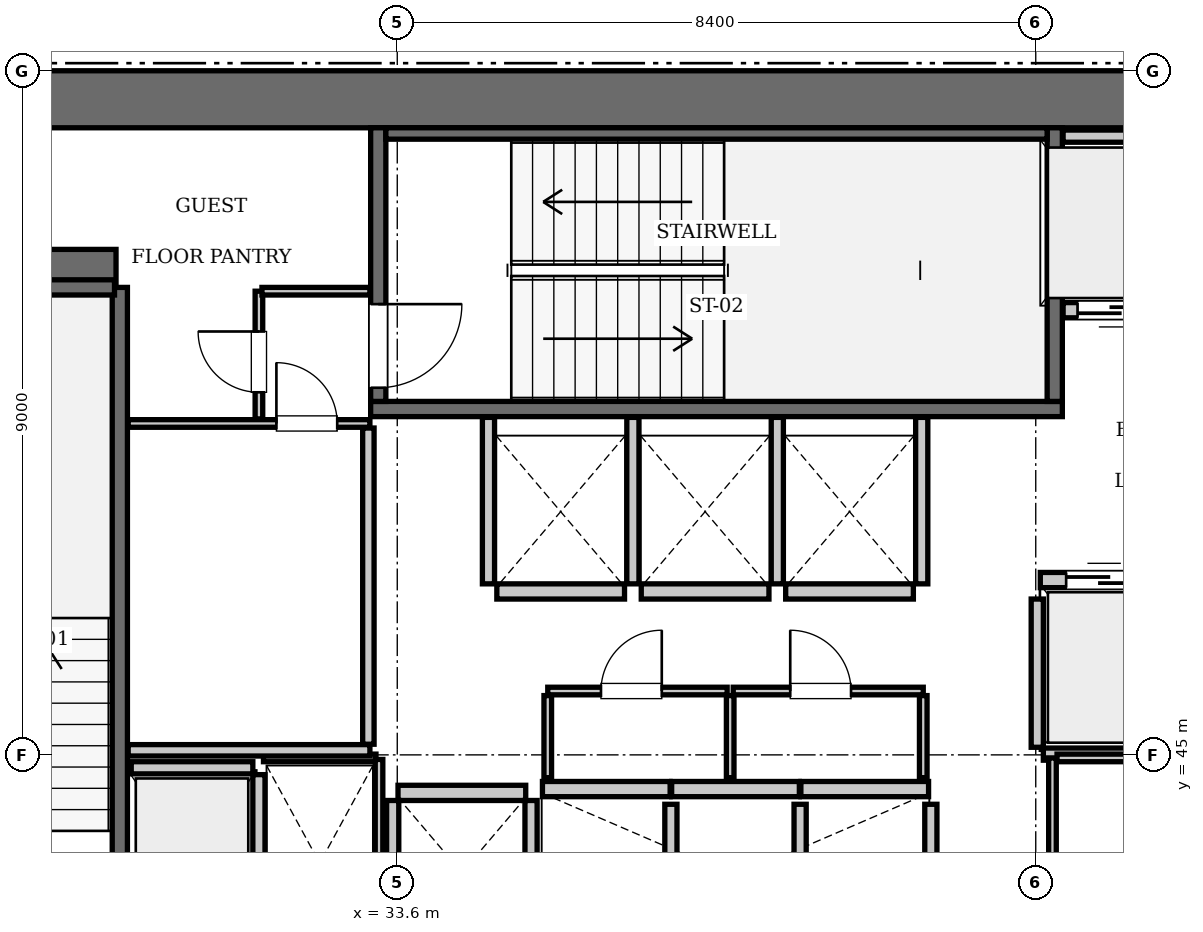
"""IFC4 building model, lengths in metres.
Left out: names, types, materials, properties, quantities, classifications, styles, units other than length and angle.
Written with IfcOpenShell. Run it as: python <this file> out.ifc"""

import sys

from ifc_helpers import new_model, si_unit, direction, frame, frame_2d, origin, place, context, subcontext, project, spatial, rectangle, extrude, element, fill, save


model = new_model("IFC4")
c1 = context("Model", 3, precision=1e-05, world=origin(), true_north=direction((0.0, 1.0)))
c2 = subcontext(c1, "Body", "Model", "MODEL_VIEW")
j1 = project(units=[si_unit("LENGTHUNIT", "METRE"), si_unit("PLANEANGLEUNIT", "RADIAN")], contexts=[c1])
p1 = place(None, origin())
s1 = spatial("IfcSite", under=j1, at=p1, CompositionType="ELEMENT")
p2 = place(p1, origin())
s2 = spatial("IfcBuilding", under=s1, at=p2, CompositionType="ELEMENT")
p3 = place(p2, frame((0.0, 0.0, 158.2)))
s3 = spatial("IfcBuildingStorey", under=s2, at=p3, CompositionType="ELEMENT", Elevation=158.2)
p4 = place(p3, frame((25.2, 53.625, 0.0), z_axis=(0.0, 0.0, 1.0), x_axis=(1.0, 0.0, 0.0)))
e1 = element("IfcWall", 1, at=p4, inside=s3, PredefinedType="SHEAR", context=c2, shape_type="SweptSolid", body=[
    extrude(rectangle(XDim=25.2, YDim=0.75, at=frame_2d((12.6, 0.0))), origin(), (0.0, 0.0, 1.0), 3.85),
])
p5 = place(p3, frame((25.95, 51.4, 0.0), z_axis=(0.0, 0.0, 1.0), x_axis=(1.0, 0.0, 0.0)))
e2 = element("IfcWall", 2, at=p5, inside=s3, PredefinedType="SHEAR", context=c2, shape_type="SweptSolid", body=[
    extrude(rectangle(XDim=3.95, YDim=0.5, at=frame_2d((1.975, 0.0))), origin(), (0.0, 0.0, 1.0), 3.85),
])
p6 = place(p3, frame((29.95, 42.15, 0.0), z_axis=(0.0, 0.0, 1.0), x_axis=(0.0, 1.0, 0.0)))
e3 = element("IfcWall", 3, at=p6, inside=s3, PredefinedType="SOLIDWALL", context=c2, shape_type="SweptSolid", body=[
    extrude(rectangle(XDim=9.0, YDim=0.2, at=frame_2d((4.5, 0.0))), origin(), (0.0, 0.0, 1.0), 3.61),
])
p7 = place(p3, frame((26.38, 51.15, 0.0), z_axis=(0.0, 0.0, 1.0), x_axis=(1.0, 0.0, 0.0)))
e4 = element("IfcWall", 4, at=p7, inside=s3, PredefinedType="SOLIDWALL", context=c2, shape_type="SweptSolid", body=[
    extrude(rectangle(XDim=3.5, YDim=0.2, at=frame_2d((1.75, 0.0))), origin(), (0.0, 0.0, 1.0), 3.61),
])
p8 = place(p3, frame((33.25, 49.55, 0.0), z_axis=(0.0, 0.0, 1.0), x_axis=(1.0, 0.0, 0.0)))
e5 = element("IfcWall", 5, at=p8, inside=s3, PredefinedType="SOLIDWALL", context=c2, shape_type="SweptSolid", body=[
    extrude(rectangle(XDim=9.1, YDim=0.2, at=frame_2d((4.55, 0.0))), origin(), (0.0, 0.0, 1.0), 3.61),
])
p9 = place(p3, frame((42.25, 49.65, 0.0), z_axis=(0.0, 0.0, 1.0), x_axis=(0.0, 1.0, 0.0)))
e6 = element("IfcWall", 6, at=p9, inside=s3, PredefinedType="SOLIDWALL", context=c2, shape_type="SweptSolid", body=[
    extrude(rectangle(XDim=3.6, YDim=0.2, at=frame_2d((1.8, 0.0))), origin(), (0.0, 0.0, 1.0), 3.61),
])
p10 = place(p3, frame((33.35, 49.65, 0.0), z_axis=(0.0, 0.0, 1.0), x_axis=(0.0, 1.0, 0.0)))
e7 = element("IfcWall", 7, at=p10, inside=s3, PredefinedType="SOLIDWALL", context=c2, shape_type="SweptSolid", body=[
    extrude(rectangle(XDim=3.6, YDim=0.2, at=frame_2d((1.8, 0.0))), origin(), (0.0, 0.0, 1.0), 3.61),
])
p11 = place(p10, frame((0.18, 0.0, 0.0)))
e8 = element("IfcOpeningElement", 8, at=p11, cuts=e7, PredefinedType="OPENING", context=c2, shape_type="SweptSolid", body=[
    extrude(rectangle(XDim=1.1, YDim=2.15, at=frame_2d((0.55, 1.075))), frame((0.0, 0.11, 0.0), z_axis=(0.0, -1.0, 0.0), x_axis=(1.0, 0.0, 0.0)), (0.0, 0.0, 1.0), 0.22),
])
p12 = place(p3, frame((33.45, 53.175, 0.0), z_axis=(0.0, 0.0, 1.0), x_axis=(1.0, 0.0, 0.0)))
e9 = element("IfcWall", 9, at=p12, inside=s3, PredefinedType="SOLIDWALL", context=c2, shape_type="SweptSolid", body=[
    extrude(rectangle(XDim=8.7, YDim=0.15, at=frame_2d((4.35, 0.0))), origin(), (0.0, 0.0, 1.0), 3.61),
])
p13 = place(p3, frame((42.06, 47.3, 0.0), z_axis=(0.0, 0.0, 1.0), x_axis=(1.0, 0.0, 0.0)))
e10 = element("IfcWall", 10, at=p13, inside=s3, PredefinedType="SOLIDWALL", context=c2, shape_type="SweptSolid", body=[
    extrude(rectangle(XDim=1.68, YDim=0.2, at=frame_2d((0.84, 0.0))), origin(), (0.0, 0.0, 1.0), 3.61),
])
p14 = place(p13, frame((0.34, 0.0, 0.0)))
e11 = element("IfcOpeningElement", 11, at=p14, cuts=e10, PredefinedType="OPENING", context=c2, shape_type="SweptSolid", body=[
    extrude(rectangle(XDim=1.0, YDim=2.15, at=frame_2d((0.5, 1.075))), frame((0.0, 0.11, 0.0), z_axis=(0.0, -1.0, 0.0), x_axis=(1.0, 0.0, 0.0)), (0.0, 0.0, 1.0), 0.22),
])
p15 = place(p3, frame((42.36, 50.85, 0.0), z_axis=(0.0, 0.0, 1.0), x_axis=(1.0, 0.0, 0.0)))
e12 = element("IfcWall", 12, at=p15, inside=s3, PredefinedType="SOLIDWALL", context=c2, shape_type="SweptSolid", body=[
    extrude(rectangle(XDim=1.38, YDim=0.2, at=frame_2d((0.69, 0.0))), origin(), (0.0, 0.0, 1.0), 3.61),
])
p16 = place(p15, frame((0.19, 0.0, 0.0)))
e13 = element("IfcOpeningElement", 13, at=p16, cuts=e12, PredefinedType="OPENING", context=c2, shape_type="SweptSolid", body=[
    extrude(rectangle(XDim=1.0, YDim=2.15, at=frame_2d((0.5, 1.075))), frame((0.0, 0.11, 0.0), z_axis=(0.0, -1.0, 0.0), x_axis=(1.0, 0.0, 0.0)), (0.0, 0.0, 1.0), 0.22),
])
for number, where, z_axis, x_axis in (
    (14, (35.51, 44.55, 0.0), (0.0, 0.0, 1.0), (1.0, 0.0, 0.0)),
    (15, (37.21, 44.55, 0.0), (0.0, 0.0, 1.0), (1.0, 0.0, 0.0)),
):
    element("IfcWall", number, at=place(p3, frame(where, z_axis=z_axis, x_axis=x_axis)), inside=s3, PredefinedType="SOLIDWALL", context=c2, shape_type="SweptSolid", body=[
        extrude(rectangle(XDim=1.68, YDim=0.2, at=frame_2d((0.84, 0.0))), origin(), (0.0, 0.0, 1.0), 3.61),
    ])
for number, where, z_axis, x_axis in (
    (16, (38.91, 44.55, 0.0), (0.0, 0.0, 1.0), (1.0, 0.0, 0.0)),
    (17, (34.91, 47.15, 0.0), (0.0, 0.0, 1.0), (1.0, 0.0, 0.0)),
):
    element("IfcWall", number, at=place(p3, frame(where, z_axis=z_axis, x_axis=x_axis)), inside=s3, PredefinedType="SOLIDWALL", context=c2, shape_type="SweptSolid", body=[
        extrude(rectangle(XDim=1.68, YDim=0.2, at=frame_2d((0.84, 0.0))), origin(), (0.0, 0.0, 1.0), 3.61),
    ])
for number, where, z_axis, x_axis in (
    (18, (36.81, 47.15, 0.0), (0.0, 0.0, 1.0), (1.0, 0.0, 0.0)),
    (19, (38.71, 47.15, 0.0), (0.0, 0.0, 1.0), (1.0, 0.0, 0.0)),
    (20, (33.61, 44.5, 0.0), (0.0, 0.0, 1.0), (1.0, 0.0, 0.0)),
):
    element("IfcWall", number, at=place(p3, frame(where, z_axis=z_axis, x_axis=x_axis)), inside=s3, PredefinedType="SOLIDWALL", context=c2, shape_type="SweptSolid", body=[
        extrude(rectangle(XDim=1.68, YDim=0.2, at=frame_2d((0.84, 0.0))), origin(), (0.0, 0.0, 1.0), 3.61),
    ])
p17 = place(p3, frame((30.1, 44.83, 0.0), z_axis=(0.0, 0.0, 1.0), x_axis=(1.0, 0.0, 0.0)))
e21 = element("IfcWall", 21, at=p17, inside=s3, PredefinedType="SOLIDWALL", context=c2, shape_type="SweptSolid", body=[
    extrude(rectangle(XDim=1.6, YDim=0.16, at=frame_2d((0.8, 0.0))), origin(), (0.0, 0.0, 1.0), 3.61),
])
p18 = place(p3, frame((31.78, 42.15, 0.0), z_axis=(0.0, 0.0, 1.0), x_axis=(0.0, 1.0, 0.0)))
e22 = element("IfcWall", 22, at=p18, inside=s3, PredefinedType="SOLIDWALL", context=c2, shape_type="SweptSolid", body=[
    extrude(rectangle(XDim=2.59, YDim=0.16, at=frame_2d((1.295, 0.0))), origin(), (0.0, 0.0, 1.0), 3.61),
])
p19 = place(p3, frame((42.02, 45.1, 0.0), z_axis=(0.0, 0.0, 1.0), x_axis=(0.0, 1.0, 0.0)))
e23 = element("IfcWall", 23, at=p19, inside=s3, PredefinedType="SOLIDWALL", context=c2, shape_type="SweptSolid", body=[
    extrude(rectangle(XDim=1.95, YDim=0.16, at=frame_2d((0.975, 0.0))), origin(), (0.0, 0.0, 1.0), 3.61),
])
p20 = place(p3, frame((42.1, 45.01, 0.0), z_axis=(0.0, 0.0, 1.0), x_axis=(1.0, 0.0, 0.0)))
e24 = element("IfcWall", 24, at=p20, inside=s3, PredefinedType="SOLIDWALL", context=c2, shape_type="SweptSolid", body=[
    extrude(rectangle(XDim=3.45, YDim=0.16, at=frame_2d((1.725, 0.0))), origin(), (0.0, 0.0, 1.0), 3.61),
])
p21 = place(p3, frame((42.36, 53.14, 0.0), z_axis=(0.0, 0.0, 1.0), x_axis=(1.0, 0.0, 0.0)))
e25 = element("IfcWall", 25, at=p21, inside=s3, PredefinedType="SOLIDWALL", context=c2, shape_type="SweptSolid", body=[
    extrude(rectangle(XDim=3.14, YDim=0.16, at=frame_2d((1.57, 0.0))), origin(), (0.0, 0.0, 1.0), 3.61),
])
for number, where, z_axis, x_axis in (
    (26, (37.2, 42.15, 0.0), (0.0, 0.0, 1.0), (0.0, 1.0, 0.0)),
    (27, (38.9, 42.15, 0.0), (0.0, 0.0, 1.0), (0.0, 1.0, 0.0)),
    (28, (40.62, 42.15, 0.0), (0.0, 0.0, 1.0), (0.0, 1.0, 0.0)),
):
    element("IfcWall", number, at=place(p3, frame(where, z_axis=z_axis, x_axis=x_axis)), inside=s3, PredefinedType="SOLIDWALL", context=c2, shape_type="SweptSolid", body=[
        extrude(rectangle(XDim=2.2, YDim=0.16, at=frame_2d((1.1, 0.0))), origin(), (0.0, 0.0, 1.0), 3.61),
    ])
for number, where, z_axis, x_axis in (
    (29, (34.8, 47.25, 0.0), (0.0, 0.0, 1.0), (0.0, 1.0, 0.0)),
    (30, (36.7, 47.25, 0.0), (0.0, 0.0, 1.0), (0.0, 1.0, 0.0)),
    (31, (38.6, 47.25, 0.0), (0.0, 0.0, 1.0), (0.0, 1.0, 0.0)),
    (32, (40.5, 47.25, 0.0), (0.0, 0.0, 1.0), (0.0, 1.0, 0.0)),
):
    element("IfcWall", number, at=place(p3, frame(where, z_axis=z_axis, x_axis=x_axis)), inside=s3, PredefinedType="SOLIDWALL", context=c2, shape_type="SweptSolid", body=[
        extrude(rectangle(XDim=2.19, YDim=0.16, at=frame_2d((1.095, 0.0))), origin(), (0.0, 0.0, 1.0), 3.61),
    ])
for number, where, z_axis, x_axis in (
    (33, (33.54, 42.15, 0.0), (0.0, 0.0, 1.0), (0.0, 1.0, 0.0)),
    (34, (35.36, 42.15, 0.0), (0.0, 0.0, 1.0), (0.0, 1.0, 0.0)),
):
    element("IfcWall", number, at=place(p3, frame(where, z_axis=z_axis, x_axis=x_axis)), inside=s3, PredefinedType="SOLIDWALL", context=c2, shape_type="SweptSolid", body=[
        extrude(rectangle(XDim=2.25, YDim=0.16, at=frame_2d((1.125, 0.0))), origin(), (0.0, 0.0, 1.0), 3.61),
    ])
p22 = place(p3, frame((31.84, 44.96, 0.0), z_axis=(0.0, 0.0, 1.0), x_axis=(1.0, 0.0, 0.0)))
e35 = element("IfcWall", 35, at=p22, inside=s3, PredefinedType="PARTITIONING", context=c2, shape_type="SweptSolid", body=[
    extrude(rectangle(XDim=1.48, YDim=0.1, at=frame_2d((0.74, 0.0))), origin(), (0.0, 0.0, 1.0), 3.61),
])
p23 = place(p3, frame((33.36, 42.21, 0.0), z_axis=(0.0, 0.0, 1.0), x_axis=(0.0, 1.0, 0.0)))
e36 = element("IfcWall", 36, at=p23, inside=s3, PredefinedType="PARTITIONING", context=c2, shape_type="SweptSolid", body=[
    extrude(rectangle(XDim=2.73, YDim=0.1, at=frame_2d((1.365, 0.0))), origin(), (0.0, 0.0, 1.0), 3.61),
])
p24 = place(p3, frame((35.58, 45.84, 0.0), z_axis=(0.0, 0.0, 1.0), x_axis=(1.0, 0.0, 0.0)))
e37 = element("IfcWall", 37, at=p24, inside=s3, PredefinedType="PARTITIONING", context=c2, shape_type="SweptSolid", body=[
    extrude(rectangle(XDim=2.36, YDim=0.1, at=frame_2d((1.18, 0.0))), origin(), (0.0, 0.0, 1.0), 3.61),
])
p25 = place(p24, frame((0.7, 0.0, 0.0)))
e38 = element("IfcOpeningElement", 38, at=p25, cuts=e37, PredefinedType="OPENING", context=c2, shape_type="SweptSolid", body=[
    extrude(rectangle(XDim=0.8, YDim=2.05, at=frame_2d((0.4, 1.025))), frame((0.0, 0.06, 0.0), z_axis=(0.0, -1.0, 0.0), x_axis=(1.0, 0.0, 0.0)), (0.0, 0.0, 1.0), 0.12),
])
p26 = place(p3, frame((38.02, 45.84, 0.0), z_axis=(0.0, 0.0, 1.0), x_axis=(1.0, 0.0, 0.0)))
e39 = element("IfcWall", 39, at=p26, inside=s3, PredefinedType="PARTITIONING", context=c2, shape_type="SweptSolid", body=[
    extrude(rectangle(XDim=2.5, YDim=0.1, at=frame_2d((1.25, 0.0))), origin(), (0.0, 0.0, 1.0), 3.61),
])
p27 = place(p26, frame((0.75, 0.0, 0.0)))
e40 = element("IfcOpeningElement", 40, at=p27, cuts=e39, PredefinedType="OPENING", context=c2, shape_type="SweptSolid", body=[
    extrude(rectangle(XDim=0.8, YDim=2.05, at=frame_2d((0.4, 1.025))), frame((0.0, 0.06, 0.0), z_axis=(0.0, -1.0, 0.0), x_axis=(1.0, 0.0, 0.0)), (0.0, 0.0, 1.0), 0.12),
])
for number, where, z_axis, x_axis in (
    (41, (35.58, 44.7, 0.0), (0.0, 0.0, 1.0), (0.0, 1.0, 0.0)),
    (42, (37.98, 44.7, 0.0), (0.0, 0.0, 1.0), (0.0, 1.0, 0.0)),
    (43, (40.52, 44.7, 0.0), (0.0, 0.0, 1.0), (0.0, 1.0, 0.0)),
):
    element("IfcWall", number, at=place(p3, frame(where, z_axis=z_axis, x_axis=x_axis)), inside=s3, PredefinedType="PARTITIONING", context=c2, shape_type="SweptSolid", body=[
        extrude(rectangle(XDim=1.08, YDim=0.1, at=frame_2d((0.54, 0.0))), origin(), (0.0, 0.0, 1.0), 3.61),
    ])
p28 = place(p3, frame((42.22, 42.2, 0.0), z_axis=(0.0, 0.0, 1.0), x_axis=(0.0, 1.0, 0.0)))
e44 = element("IfcWall", 44, at=p28, inside=s3, PredefinedType="PARTITIONING", context=c2, shape_type="SweptSolid", body=[
    extrude(rectangle(XDim=2.76, YDim=0.1, at=frame_2d((1.38, 0.0))), origin(), (0.0, 0.0, 1.0), 3.61),
])
p29 = place(p28, frame((0.65, 0.0, 0.0)))
e45 = element("IfcOpeningElement", 45, at=p29, cuts=e44, PredefinedType="OPENING", context=c2, shape_type="SweptSolid", body=[
    extrude(rectangle(XDim=0.8, YDim=2.05, at=frame_2d((0.4, 1.025))), frame((0.0, 0.06, 0.0), z_axis=(0.0, -1.0, 0.0), x_axis=(1.0, 0.0, 0.0)), (0.0, 0.0, 1.0), 0.12),
])
p30 = place(p3, frame((42.28, 44.96, 0.0), z_axis=(0.0, 0.0, 1.0), x_axis=(1.0, 0.0, 0.0)))
e46 = element("IfcWall", 46, at=p30, inside=s3, PredefinedType="PARTITIONING", context=c2, shape_type="SweptSolid", body=[
    extrude(rectangle(XDim=1.3, YDim=0.1, at=frame_2d((0.65, 0.0))), origin(), (0.0, 0.0, 1.0), 3.61),
])
p31 = place(p3, frame((30.06, 45.06, 0.0), z_axis=(0.0, 0.0, 1.0), x_axis=(1.0, 0.0, 0.0)))
e47 = element("IfcWall", 47, at=p31, inside=s3, PredefinedType="PARTITIONING", context=c2, shape_type="SweptSolid", body=[
    extrude(rectangle(XDim=3.18, YDim=0.15, at=frame_2d((1.59, 0.0))), origin(), (0.0, 0.0, 1.0), 3.61),
])
p32 = place(p3, frame((33.22, 45.14, 0.0), z_axis=(0.0, 0.0, 1.0), x_axis=(0.0, 1.0, 0.0)))
e48 = element("IfcWall", 48, at=p32, inside=s3, PredefinedType="PARTITIONING", context=c2, shape_type="SweptSolid", body=[
    extrude(rectangle(XDim=4.16, YDim=0.15, at=frame_2d((2.08, 0.0))), origin(), (0.0, 0.0, 1.0), 3.61),
])
p33 = place(p3, frame((30.06, 49.36, 0.0), z_axis=(0.0, 0.0, 1.0), x_axis=(1.0, 0.0, 0.0)))
e49 = element("IfcWall", 49, at=p33, inside=s3, PredefinedType="PARTITIONING", context=c2, shape_type="SweptSolid", body=[
    extrude(rectangle(XDim=3.18, YDim=0.1, at=frame_2d((1.59, 0.0))), origin(), (0.0, 0.0, 1.0), 3.61),
])
p34 = place(p33, frame((1.95, 0.0, 0.0)))
e50 = element("IfcOpeningElement", 50, at=p34, cuts=e49, PredefinedType="OPENING", context=c2, shape_type="SweptSolid", body=[
    extrude(rectangle(XDim=0.8, YDim=2.05, at=frame_2d((0.4, 1.025))), frame((0.0, 0.06, 0.0), z_axis=(0.0, -1.0, 0.0), x_axis=(1.0, 0.0, 0.0)), (0.0, 0.0, 1.0), 0.12),
])
p35 = place(p3, frame((31.78, 49.42, 0.0), z_axis=(0.0, 0.0, 1.0), x_axis=(0.0, 1.0, 0.0)))
e51 = element("IfcWall", 51, at=p35, inside=s3, PredefinedType="PARTITIONING", context=c2, shape_type="SweptSolid", body=[
    extrude(rectangle(XDim=1.68, YDim=0.1, at=frame_2d((0.84, 0.0))), origin(), (0.0, 0.0, 1.0), 3.61),
])
p36 = place(p35, frame((0.35, 0.0, 0.0)))
e52 = element("IfcOpeningElement", 52, at=p36, cuts=e51, PredefinedType="OPENING", context=c2, shape_type="SweptSolid", body=[
    extrude(rectangle(XDim=0.8, YDim=2.05, at=frame_2d((0.4, 1.025))), frame((0.0, 0.06, 0.0), z_axis=(0.0, -1.0, 0.0), x_axis=(1.0, 0.0, 0.0)), (0.0, 0.0, 1.0), 0.12),
])
p37 = place(p3, frame((31.82, 51.1, 0.0), z_axis=(0.0, 0.0, 1.0), x_axis=(1.0, 0.0, 0.0)))
e53 = element("IfcWall", 53, at=p37, inside=s3, PredefinedType="PARTITIONING", context=c2, shape_type="SweptSolid", body=[
    extrude(rectangle(XDim=1.42, YDim=0.1, at=frame_2d((0.71, 0.0))), origin(), (0.0, 0.0, 1.0), 3.61),
])
p38 = place(p11, frame((1.1, 0.0, 0.0), z_axis=(0.0, 0.0, 1.0), x_axis=(-1.0, 0.0, 0.0)))
e54 = element("IfcDoor", 54, at=p38, inside=s3, OperationType="SINGLE_SWING_LEFT", PredefinedType="DOOR", context=c2, shape_type="SweptSolid", body=[
    extrude(rectangle(XDim=1.1, YDim=2.15, at=frame_2d((0.55, 1.075))), frame((0.0, 0.025, 0.0), z_axis=(0.0, -1.0, 0.0), x_axis=(1.0, 0.0, 0.0)), (0.0, 0.0, 1.0), 0.05),
])
fill(e8, e54)
p39 = place(p14, origin())
e55 = element("IfcDoor", 55, at=p39, inside=s3, OperationType="SLIDING_TO_LEFT", PredefinedType="DOOR", context=c2, shape_type="SweptSolid", body=[
    extrude(rectangle(XDim=1.0, YDim=2.15, at=frame_2d((0.5, 1.075))), frame((0.0, 0.025, 0.0), z_axis=(0.0, -1.0, 0.0), x_axis=(1.0, 0.0, 0.0)), (0.0, 0.0, 1.0), 0.05),
])
fill(e11, e55)
p40 = place(p16, frame((1.0, 0.0, 0.0), z_axis=(0.0, 0.0, 1.0), x_axis=(-1.0, 0.0, 0.0)))
e56 = element("IfcDoor", 56, at=p40, inside=s3, OperationType="SLIDING_TO_LEFT", PredefinedType="DOOR", context=c2, shape_type="SweptSolid", body=[
    extrude(rectangle(XDim=1.0, YDim=2.15, at=frame_2d((0.5, 1.075))), frame((0.0, 0.025, 0.0), z_axis=(0.0, -1.0, 0.0), x_axis=(1.0, 0.0, 0.0)), (0.0, 0.0, 1.0), 0.05),
])
fill(e13, e56)
p41 = place(p25, origin())
e57 = element("IfcDoor", 57, at=p41, inside=s3, OperationType="SINGLE_SWING_RIGHT", PredefinedType="DOOR", context=c2, shape_type="SweptSolid", body=[
    extrude(rectangle(XDim=0.8, YDim=2.05, at=frame_2d((0.4, 1.025))), frame((0.0, 0.025, 0.0), z_axis=(0.0, -1.0, 0.0), x_axis=(1.0, 0.0, 0.0)), (0.0, 0.0, 1.0), 0.05),
])
fill(e38, e57)
p42 = place(p27, origin())
e58 = element("IfcDoor", 58, at=p42, inside=s3, OperationType="SINGLE_SWING_LEFT", PredefinedType="DOOR", context=c2, shape_type="SweptSolid", body=[
    extrude(rectangle(XDim=0.8, YDim=2.05, at=frame_2d((0.4, 1.025))), frame((0.0, 0.025, 0.0), z_axis=(0.0, -1.0, 0.0), x_axis=(1.0, 0.0, 0.0)), (0.0, 0.0, 1.0), 0.05),
])
fill(e40, e58)
p43 = place(p34, origin())
e59 = element("IfcDoor", 59, at=p43, inside=s3, OperationType="SINGLE_SWING_LEFT", PredefinedType="DOOR", context=c2, shape_type="SweptSolid", body=[
    extrude(rectangle(XDim=0.8, YDim=2.05, at=frame_2d((0.4, 1.025))), frame((0.0, 0.025, 0.0), z_axis=(0.0, -1.0, 0.0), x_axis=(1.0, 0.0, 0.0)), (0.0, 0.0, 1.0), 0.05),
])
fill(e50, e59)
p44 = place(p36, origin())
e60 = element("IfcDoor", 60, at=p44, inside=s3, OperationType="SINGLE_SWING_RIGHT", PredefinedType="DOOR", context=c2, shape_type="SweptSolid", body=[
    extrude(rectangle(XDim=0.8, YDim=2.05, at=frame_2d((0.4, 1.025))), frame((0.0, 0.025, 0.0), z_axis=(0.0, -1.0, 0.0), x_axis=(1.0, 0.0, 0.0)), (0.0, 0.0, 1.0), 0.05),
])
fill(e52, e60)
save(model, sys.argv[1])
